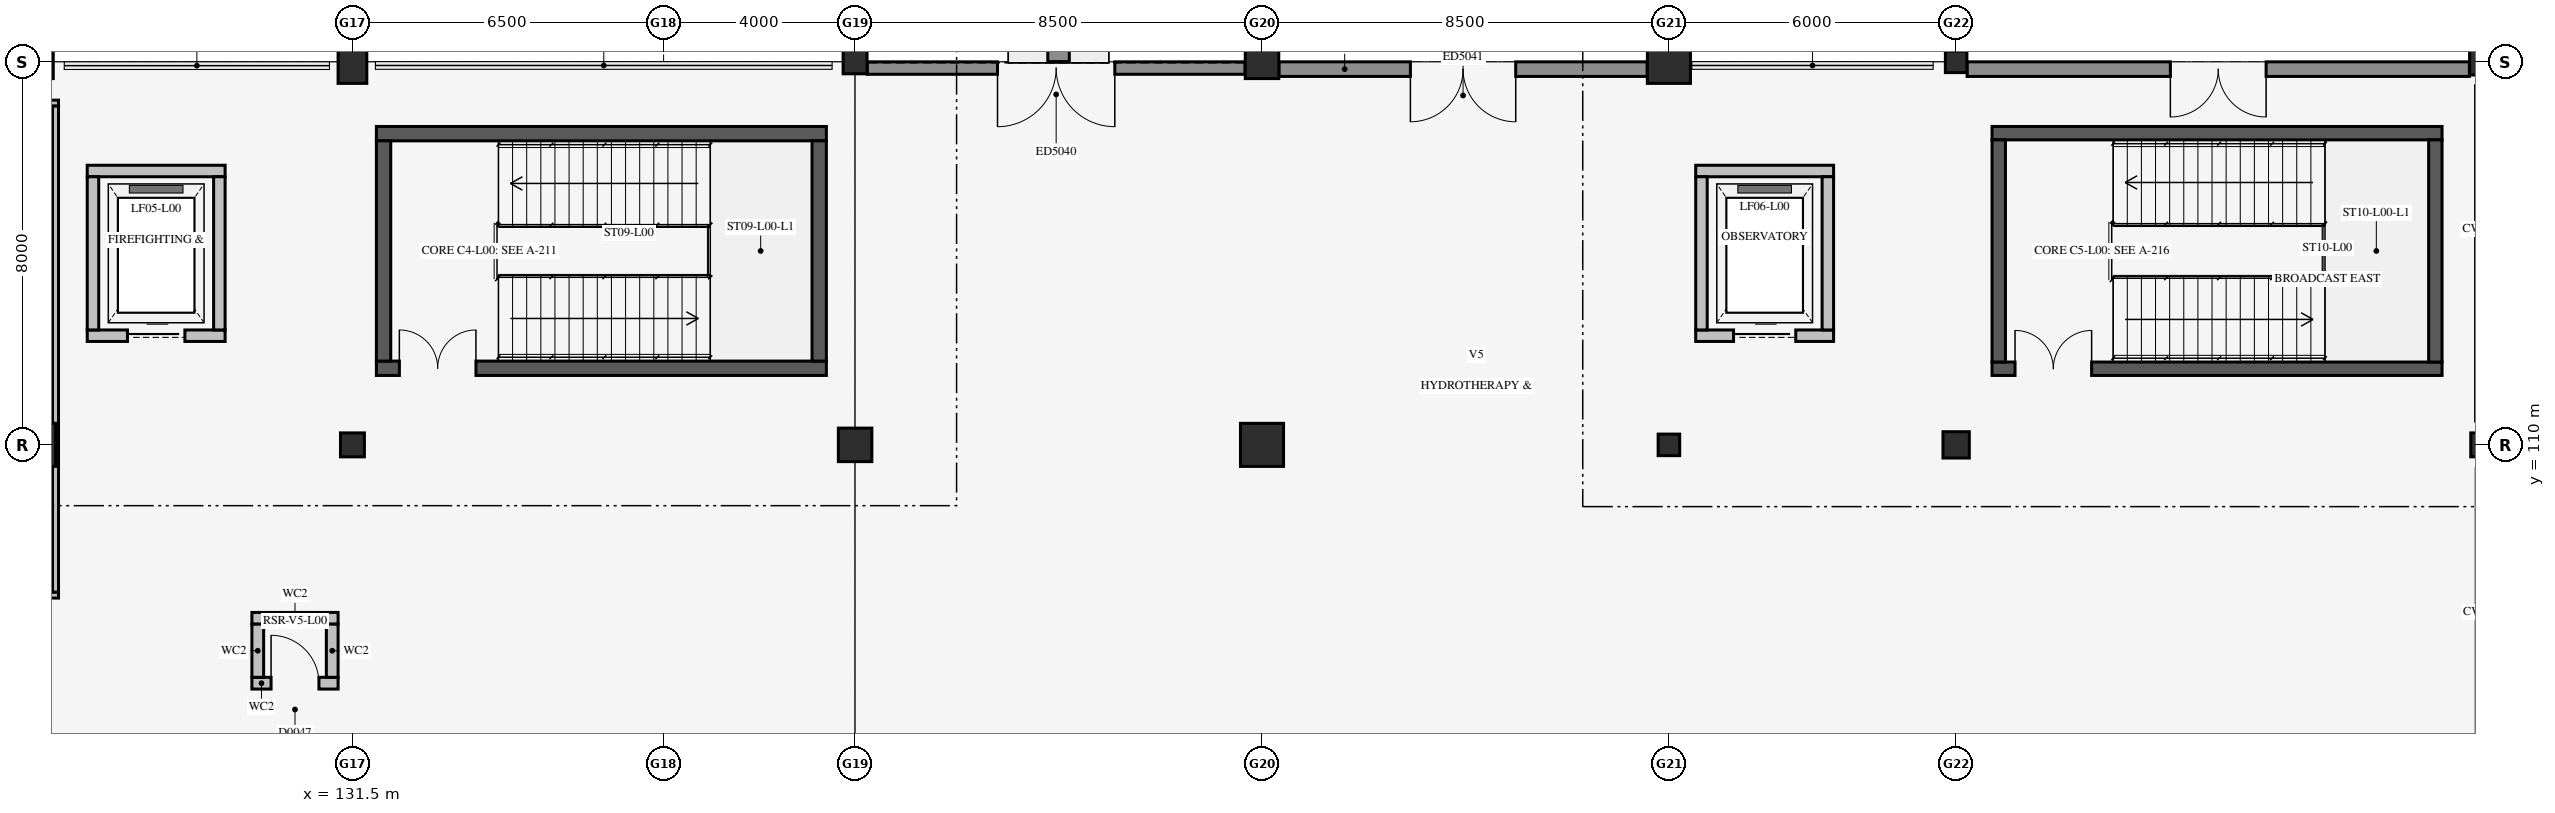
"""IFC4 building model, lengths in metres.
Left out: names, types, materials, properties, quantities, classifications, styles, units other than length and angle.
Written with IfcOpenShell. Run it as: python <this file> out.ifc"""

import sys

from ifc_helpers import new_model, si_unit, direction, frame, frame_2d, origin, origin_2d, place, context, subcontext, project, spatial, polyline, rectangle, circle, outline, extrude, element, fill, save


model = new_model("IFC4")
c1 = context("Model", 3, precision=1e-05, world=origin(), true_north=direction((0.0, 1.0)))
c2 = subcontext(c1, "Body", "Model", "MODEL_VIEW")
j1 = project(units=[si_unit("LENGTHUNIT", "METRE"), si_unit("PLANEANGLEUNIT", "RADIAN")], contexts=[c1])
p1 = place(None, origin())
s1 = spatial("IfcSite", under=j1, at=p1, CompositionType="ELEMENT")
p2 = place(p1, origin())
s2 = spatial("IfcBuilding", under=s1, at=p2, CompositionType="ELEMENT")
p3 = place(p2, origin())
s3 = spatial("IfcBuildingStorey", under=s2, at=p3, CompositionType="ELEMENT", Elevation=0.0)
p4 = place(p3, frame((132.0, 111.6, 0.0), z_axis=(0.0, 0.0, 1.0), x_axis=(1.0, 0.0, 0.0)))
e1 = element("IfcWall", 1, at=p4, inside=s3, PredefinedType="SHEAR", context=c2, shape_type="SweptSolid", body=[
    extrude(rectangle(XDim=9.4, YDim=0.3, at=frame_2d((4.7, 0.0))), origin(), (0.0, 0.0, 1.0), 5.14),
])
p5 = place(p4, frame((0.48, 0.0, 0.0)))
e2 = element("IfcOpeningElement", 2, at=p5, cuts=e1, PredefinedType="OPENING", context=c2, shape_type="SweptSolid", body=[
    extrude(rectangle(XDim=1.6, YDim=2.2, at=frame_2d((0.8, 1.1))), frame((0.0, 0.162, 0.0), z_axis=(0.0, -1.0, 0.0), x_axis=(1.0, 0.0, 0.0)), (0.0, 0.0, 1.0), 0.324),
])
p6 = place(p3, frame((132.0, 116.5, 0.0), z_axis=(0.0, 0.0, 1.0), x_axis=(1.0, 0.0, 0.0)))
e3 = element("IfcWall", 3, at=p6, inside=s3, PredefinedType="SHEAR", context=c2, shape_type="SweptSolid", body=[
    extrude(rectangle(XDim=9.4, YDim=0.3, at=frame_2d((4.7, 0.0))), origin(), (0.0, 0.0, 1.0), 5.14),
])
for number, where, z_axis, x_axis in (
    (4, (132.15, 111.75, 0.0), (0.0, 0.0, 1.0), (0.0, 1.0, 0.0)),
    (5, (141.25, 111.75, 0.0), (0.0, 0.0, 1.0), (0.0, 1.0, 0.0)),
):
    element("IfcWall", number, at=place(p3, frame(where, z_axis=z_axis, x_axis=x_axis)), inside=s3, PredefinedType="SHEAR", context=c2, shape_type="SweptSolid", body=[
        extrude(rectangle(XDim=4.6, YDim=0.3, at=frame_2d((2.3, 0.0))), origin(), (0.0, 0.0, 1.0), 5.14),
    ])
p7 = place(p3, frame((165.75, 111.59, 0.0), z_axis=(0.0, 0.0, 1.0), x_axis=(1.0, 0.0, 0.0)))
e6 = element("IfcWall", 6, at=p7, inside=s3, PredefinedType="SHEAR", context=c2, shape_type="SweptSolid", body=[
    extrude(rectangle(XDim=9.4, YDim=0.28, at=frame_2d((4.7, 0.0))), origin(), (0.0, 0.0, 1.0), 5.14),
])
p8 = place(p7, frame((0.48, 0.0, 0.0)))
e7 = element("IfcOpeningElement", 7, at=p8, cuts=e6, PredefinedType="OPENING", context=c2, shape_type="SweptSolid", body=[
    extrude(rectangle(XDim=1.6, YDim=2.2, at=frame_2d((0.8, 1.1))), frame((0.0, 0.152, 0.0), z_axis=(0.0, -1.0, 0.0), x_axis=(1.0, 0.0, 0.0)), (0.0, 0.0, 1.0), 0.304),
])
p9 = place(p3, frame((165.75, 116.51, 0.0), z_axis=(0.0, 0.0, 1.0), x_axis=(1.0, 0.0, 0.0)))
e8 = element("IfcWall", 8, at=p9, inside=s3, PredefinedType="SHEAR", context=c2, shape_type="SweptSolid", body=[
    extrude(rectangle(XDim=9.4, YDim=0.28, at=frame_2d((4.7, 0.0))), origin(), (0.0, 0.0, 1.0), 5.14),
])
for number, where, z_axis, x_axis in (
    (9, (165.89, 111.73, 0.0), (0.0, 0.0, 1.0), (0.0, 1.0, 0.0)),
    (10, (175.01, 111.73, 0.0), (0.0, 0.0, 1.0), (0.0, 1.0, 0.0)),
):
    element("IfcWall", number, at=place(p3, frame(where, z_axis=z_axis, x_axis=x_axis)), inside=s3, PredefinedType="SHEAR", context=c2, shape_type="SweptSolid", body=[
        extrude(rectangle(XDim=4.64, YDim=0.28, at=frame_2d((2.32, 0.0))), origin(), (0.0, 0.0, 1.0), 5.14),
    ])
p10 = place(p3, frame((125.96, 112.28, 0.0), z_axis=(0.0, 0.0, 1.0), x_axis=(1.0, 0.0, 0.0)))
e11 = element("IfcWall", 11, at=p10, inside=s3, PredefinedType="SOLIDWALL", context=c2, shape_type="SweptSolid", body=[
    extrude(rectangle(XDim=2.88, YDim=0.24, at=frame_2d((1.44, 0.0))), origin(), (0.0, 0.0, 1.0), 5.4),
])
p11 = place(p10, frame((0.84, 0.0, 0.0)))
e12 = element("IfcOpeningElement", 12, at=p11, cuts=e11, PredefinedType="OPENING", context=c2, shape_type="SweptSolid", body=[
    extrude(rectangle(XDim=1.2, YDim=2.2, at=frame_2d((0.6, 1.1))), frame((0.0, 0.132, 0.0), z_axis=(0.0, -1.0, 0.0), x_axis=(1.0, 0.0, 0.0)), (0.0, 0.0, 1.0), 0.264),
])
p12 = place(p3, frame((125.96, 115.72, 0.0), z_axis=(0.0, 0.0, 1.0), x_axis=(1.0, 0.0, 0.0)))
e13 = element("IfcWall", 13, at=p12, inside=s3, PredefinedType="SOLIDWALL", context=c2, shape_type="SweptSolid", body=[
    extrude(rectangle(XDim=2.88, YDim=0.24, at=frame_2d((1.44, 0.0))), origin(), (0.0, 0.0, 1.0), 5.4),
])
for number, where, z_axis, x_axis in (
    (14, (126.08, 112.4, 0.0), (0.0, 0.0, 1.0), (0.0, 1.0, 0.0)),
    (15, (128.72, 112.4, 0.0), (0.0, 0.0, 1.0), (0.0, 1.0, 0.0)),
):
    element("IfcWall", number, at=place(p3, frame(where, z_axis=z_axis, x_axis=x_axis)), inside=s3, PredefinedType="SOLIDWALL", context=c2, shape_type="SweptSolid", body=[
        extrude(rectangle(XDim=3.2, YDim=0.24, at=frame_2d((1.6, 0.0))), origin(), (0.0, 0.0, 1.0), 5.4),
    ])
p13 = place(p3, frame((159.56, 112.28, 0.0), z_axis=(0.0, 0.0, 1.0), x_axis=(1.0, 0.0, 0.0)))
e16 = element("IfcWall", 16, at=p13, inside=s3, PredefinedType="SOLIDWALL", context=c2, shape_type="SweptSolid", body=[
    extrude(rectangle(XDim=2.88, YDim=0.24, at=frame_2d((1.44, 0.0))), origin(), (0.0, 0.0, 1.0), 5.4),
])
p14 = place(p13, frame((0.79, 0.0, 0.0)))
e17 = element("IfcOpeningElement", 17, at=p14, cuts=e16, PredefinedType="OPENING", context=c2, shape_type="SweptSolid", body=[
    extrude(rectangle(XDim=1.3, YDim=2.25, at=frame_2d((0.65, 1.125))), frame((0.0, 0.132, 0.0), z_axis=(0.0, -1.0, 0.0), x_axis=(1.0, 0.0, 0.0)), (0.0, 0.0, 1.0), 0.264),
])
p15 = place(p3, frame((159.56, 115.72, 0.0), z_axis=(0.0, 0.0, 1.0), x_axis=(1.0, 0.0, 0.0)))
e18 = element("IfcWall", 18, at=p15, inside=s3, PredefinedType="SOLIDWALL", context=c2, shape_type="SweptSolid", body=[
    extrude(rectangle(XDim=2.88, YDim=0.24, at=frame_2d((1.44, 0.0))), origin(), (0.0, 0.0, 1.0), 5.4),
])
for number, where, z_axis, x_axis in (
    (19, (159.68, 112.4, 0.0), (0.0, 0.0, 1.0), (0.0, 1.0, 0.0)),
    (20, (162.32, 112.4, 0.0), (0.0, 0.0, 1.0), (0.0, 1.0, 0.0)),
):
    element("IfcWall", number, at=place(p3, frame(where, z_axis=z_axis, x_axis=x_axis)), inside=s3, PredefinedType="SOLIDWALL", context=c2, shape_type="SweptSolid", body=[
        extrude(rectangle(XDim=3.2, YDim=0.24, at=frame_2d((1.6, 0.0))), origin(), (0.0, 0.0, 1.0), 5.4),
    ])
p16 = place(p3, frame((125.0, 110.0, 0.0), z_axis=(0.0, 0.0, 1.0), x_axis=(1.0, 0.0, 0.0)))
e21 = element("IfcColumn", 21, at=p16, inside=s3, PredefinedType="COLUMN", context=c2, shape_type="SweptSolid", body=[
    extrude(rectangle(XDim=0.6, YDim=0.9, at=origin_2d()), origin(), (0.0, 0.0, 1.0), 5.4),
])
p17 = place(p3, frame((125.0, 118.0, 0.0), z_axis=(0.0, 0.0, 1.0), x_axis=(1.0, 0.0, 0.0)))
e22 = element("IfcColumn", 22, at=p17, inside=s3, PredefinedType="COLUMN", context=c2, shape_type="SweptSolid", body=[
    extrude(rectangle(XDim=0.5, YDim=0.7, at=origin_2d()), origin(), (0.0, 0.0, 1.0), 5.4),
])
p18 = place(p3, frame((131.5, 110.0, 0.0), z_axis=(0.0, 0.0, 1.0), x_axis=(1.0, 0.0, 0.0)))
e23 = element("IfcColumn", 23, at=p18, inside=s3, PredefinedType="COLUMN", context=c2, shape_type="SweptSolid", body=[
    extrude(circle(Radius=0.25, at=origin_2d()), origin(), (0.0, 0.0, 1.0), 5.4),
])
p19 = place(p3, frame((131.5, 118.0, 0.0), z_axis=(0.0, 0.0, 1.0), x_axis=(1.0, 0.0, 0.0)))
e24 = element("IfcColumn", 24, at=p19, inside=s3, PredefinedType="COLUMN", context=c2, shape_type="SweptSolid", body=[
    extrude(rectangle(XDim=0.6, YDim=0.9, at=origin_2d()), origin(), (0.0, 0.0, 1.0), 5.4),
])
p20 = place(p3, frame((142.0, 110.0, 0.0), z_axis=(0.0, 0.0, 1.0), x_axis=(1.0, 0.0, 0.0)))
e25 = element("IfcColumn", 25, at=p20, inside=s3, PredefinedType="COLUMN", context=c2, shape_type="SweptSolid", body=[
    extrude(circle(Radius=0.35, at=origin_2d()), origin(), (0.0, 0.0, 1.0), 5.4),
])
p21 = place(p3, frame((142.0, 118.0, 0.0), z_axis=(0.0, 0.0, 1.0), x_axis=(1.0, 0.0, 0.0)))
e26 = element("IfcColumn", 26, at=p21, inside=s3, PredefinedType="COLUMN", context=c2, shape_type="SweptSolid", body=[
    extrude(circle(Radius=0.25, at=origin_2d()), origin(), (0.0, 0.0, 1.0), 5.4),
])
p22 = place(p3, frame((150.5, 110.0, 0.0), z_axis=(0.0, 0.0, 1.0), x_axis=(1.0, 0.0, 0.0)))
e27 = element("IfcColumn", 27, at=p22, inside=s3, PredefinedType="COLUMN", context=c2, shape_type="SweptSolid", body=[
    extrude(circle(Radius=0.45, at=origin_2d()), origin(), (0.0, 0.0, 1.0), 5.4),
])
p23 = place(p3, frame((150.5, 118.0, 0.0), z_axis=(0.0, 0.0, 1.0), x_axis=(1.0, 0.0, 0.0)))
e28 = element("IfcColumn", 28, at=p23, inside=s3, PredefinedType="COLUMN", context=c2, shape_type="SweptSolid", body=[
    extrude(circle(Radius=0.35, at=origin_2d()), origin(), (0.0, 0.0, 1.0), 5.4),
])
p24 = place(p3, frame((159.0, 110.0, 0.0), z_axis=(0.0, 0.0, 1.0), x_axis=(1.0, 0.0, 0.0)))
e29 = element("IfcColumn", 29, at=p24, inside=s3, PredefinedType="COLUMN", context=c2, shape_type="SweptSolid", body=[
    extrude(rectangle(XDim=0.45, YDim=0.45, at=origin_2d()), origin(), (0.0, 0.0, 1.0), 5.4),
])
p25 = place(p3, frame((159.0, 118.0, 0.0), z_axis=(0.0, 0.0, 1.0), x_axis=(1.0, 0.0, 0.0)))
e30 = element("IfcColumn", 30, at=p25, inside=s3, PredefinedType="COLUMN", context=c2, shape_type="SweptSolid", body=[
    extrude(circle(Radius=0.45, at=origin_2d()), origin(), (0.0, 0.0, 1.0), 5.4),
])
p26 = place(p3, frame((165.0, 110.0, 0.0), z_axis=(0.0, 0.0, 1.0), x_axis=(1.0, 0.0, 0.0)))
e31 = element("IfcColumn", 31, at=p26, inside=s3, PredefinedType="COLUMN", context=c2, shape_type="SweptSolid", body=[
    extrude(rectangle(XDim=0.55, YDim=0.55, at=origin_2d()), origin(), (0.0, 0.0, 1.0), 5.4),
])
p27 = place(p3, frame((165.0, 118.0, 0.0), z_axis=(0.0, 0.0, 1.0), x_axis=(1.0, 0.0, 0.0)))
e32 = element("IfcColumn", 32, at=p27, inside=s3, PredefinedType="COLUMN", context=c2, shape_type="SweptSolid", body=[
    extrude(rectangle(XDim=0.45, YDim=0.45, at=origin_2d()), origin(), (0.0, 0.0, 1.0), 5.4),
])
p28 = place(p3, frame((176.0, 110.0, 0.0), z_axis=(0.0, 0.0, 1.0), x_axis=(1.0, 0.0, 0.0)))
e33 = element("IfcColumn", 33, at=p28, inside=s3, PredefinedType="COLUMN", context=c2, shape_type="SweptSolid", body=[
    extrude(rectangle(XDim=0.5, YDim=0.5, at=origin_2d()), origin(), (0.0, 0.0, 1.0), 5.4),
])
p29 = place(p3, frame((176.0, 118.0, 0.0), z_axis=(0.0, 0.0, 1.0), x_axis=(1.0, 0.0, 0.0)))
e34 = element("IfcColumn", 34, at=p29, inside=s3, PredefinedType="COLUMN", context=c2, shape_type="SweptSolid", body=[
    extrude(rectangle(XDim=0.55, YDim=0.55, at=origin_2d()), origin(), (0.0, 0.0, 1.0), 5.4),
])
p30 = place(p3, frame((129.4, 105.022, 0.0), z_axis=(0.0, 0.0, 1.0), x_axis=(1.0, 0.0, 0.0)))
e35 = element("IfcWall", 35, at=p30, inside=s3, PredefinedType="SOLIDWALL", context=c2, shape_type="SweptSolid", body=[
    extrude(rectangle(XDim=1.8, YDim=0.245, at=frame_2d((0.9, 0.0))), origin(), (0.0, 0.0, 1.0), 5.125),
])
p31 = place(p30, frame((0.4, 0.0, 0.0)))
e36 = element("IfcOpeningElement", 36, at=p31, cuts=e35, PredefinedType="OPENING", context=c2, shape_type="SweptSolid", body=[
    extrude(rectangle(XDim=1.0, YDim=2.2, at=frame_2d((0.5, 1.1))), frame((0.0, 0.135, 0.0), z_axis=(0.0, -1.0, 0.0), x_axis=(1.0, 0.0, 0.0)), (0.0, 0.0, 1.0), 0.269),
])
p32 = place(p3, frame((129.4, 106.377, 0.0), z_axis=(0.0, 0.0, 1.0), x_axis=(1.0, 0.0, 0.0)))
e37 = element("IfcWall", 37, at=p32, inside=s3, PredefinedType="SOLIDWALL", context=c2, shape_type="SweptSolid", body=[
    extrude(rectangle(XDim=1.8, YDim=0.245, at=frame_2d((0.9, 0.0))), origin(), (0.0, 0.0, 1.0), 5.125),
])
for number, where, z_axis, x_axis in (
    (38, (131.077, 105.145, 0.0), (0.0, 0.0, 1.0), (0.0, 1.0, 0.0)),
    (39, (129.522, 105.145, 0.0), (0.0, 0.0, 1.0), (0.0, 1.0, 0.0)),
):
    element("IfcWall", number, at=place(p3, frame(where, z_axis=z_axis, x_axis=x_axis)), inside=s3, PredefinedType="SOLIDWALL", context=c2, shape_type="SweptSolid", body=[
        extrude(rectangle(XDim=1.11, YDim=0.245, at=frame_2d((0.555, 0.0))), origin(), (0.0, 0.0, 1.0), 5.125),
    ])
p33 = place(p3, frame((116.573, 106.863, 0.0), z_axis=(0.0, 0.0, 1.0), x_axis=(1.0, 0.0, 0.0)))
e40 = element("IfcWall", 40, at=p33, inside=s3, PredefinedType="PARTITIONING", context=c2, shape_type="SweptSolid", body=[
    extrude(rectangle(XDim=8.787, YDim=0.125, at=frame_2d((4.394, 0.0))), origin(), (0.0, 0.0, 1.0), 5.125),
])
p34 = place(p33, frame((3.072, 0.0, 0.0)))
e41 = element("IfcOpeningElement", 41, at=p34, cuts=e40, PredefinedType="OPENING", context=c2, shape_type="SweptSolid", body=[
    extrude(rectangle(XDim=1.05, YDim=2.15, at=frame_2d((0.525, 1.075))), frame((0.0, 0.074, 0.0), z_axis=(0.0, -1.0, 0.0), x_axis=(1.0, 0.0, 0.0)), (0.0, 0.0, 1.0), 0.149),
])
p35 = place(p3, frame((116.573, 117.137, 0.0), z_axis=(0.0, 0.0, 1.0), x_axis=(1.0, 0.0, 0.0)))
e42 = element("IfcWall", 42, at=p35, inside=s3, PredefinedType="PARTITIONING", context=c2, shape_type="SweptSolid", body=[
    extrude(rectangle(XDim=8.787, YDim=0.125, at=frame_2d((4.394, 0.0))), origin(), (0.0, 0.0, 1.0), 5.125),
])
p36 = place(p3, frame((125.298, 106.925, 0.0), z_axis=(0.0, 0.0, 1.0), x_axis=(0.0, 1.0, 0.0)))
e43 = element("IfcWall", 43, at=p36, inside=s3, PredefinedType="PARTITIONING", context=c2, shape_type="SweptSolid", body=[
    extrude(rectangle(XDim=10.15, YDim=0.125, at=frame_2d((5.075, 0.0))), origin(), (0.0, 0.0, 1.0), 5.125),
])
p37 = place(p3, frame((142.254, 117.87, 0.0), z_axis=(0.0, 0.0, 1.0), x_axis=(1.0, 0.0, 0.0)))
e44 = element("IfcWall", 44, at=p37, inside=s3, PredefinedType="SOLIDWALL", context=c2, shape_type="SweptSolid", body=[
    extrude(rectangle(XDim=7.892, YDim=0.26, at=frame_2d((3.946, 0.0))), origin(), (0.0, 0.0, 1.0), 4.574),
])
p38 = place(p37, frame((2.721, 0.0, 0.0)))
e45 = element("IfcOpeningElement", 45, at=p38, cuts=e44, PredefinedType="OPENING", context=c2, shape_type="SweptSolid", body=[
    extrude(rectangle(XDim=2.45, YDim=2.95, at=frame_2d((1.225, 1.475))), frame((0.0, 0.142, 0.0), z_axis=(0.0, -1.0, 0.0), x_axis=(1.0, 0.0, 0.0)), (0.0, 0.0, 1.0), 0.284),
])
p39 = place(p3, frame((150.854, 117.847, 0.0), z_axis=(0.0, 0.0, 1.0), x_axis=(1.0, 0.0, 0.0)))
e46 = element("IfcWall", 46, at=p39, inside=s3, PredefinedType="SOLIDWALL", context=c2, shape_type="SweptSolid", body=[
    extrude(rectangle(XDim=7.692, YDim=0.305, at=frame_2d((3.846, 0.0))), origin(), (0.0, 0.0, 1.0), 4.498),
])
p40 = place(p39, frame((2.746, 0.0, 0.0)))
e47 = element("IfcOpeningElement", 47, at=p40, cuts=e46, PredefinedType="OPENING", context=c2, shape_type="SweptSolid", body=[
    extrude(rectangle(XDim=2.2, YDim=2.6, at=frame_2d((1.1, 1.3))), frame((0.0, 0.165, 0.0), z_axis=(0.0, -1.0, 0.0), x_axis=(1.0, 0.0, 0.0)), (0.0, 0.0, 1.0), 0.329),
])
p41 = place(p3, frame((165.229, 117.847, 0.0), z_axis=(0.0, 0.0, 1.0), x_axis=(1.0, 0.0, 0.0)))
e48 = element("IfcWall", 48, at=p41, inside=s3, PredefinedType="SOLIDWALL", context=c2, shape_type="SweptSolid", body=[
    extrude(rectangle(XDim=10.492, YDim=0.305, at=frame_2d((5.246, 0.0))), origin(), (0.0, 0.0, 1.0), 4.65),
])
p42 = place(p41, frame((4.246, 0.0, 0.0)))
e49 = element("IfcOpeningElement", 49, at=p42, cuts=e48, PredefinedType="OPENING", context=c2, shape_type="SweptSolid", body=[
    extrude(rectangle(XDim=2.0, YDim=2.4, at=frame_2d((1.0, 1.2))), frame((0.0, 0.165, 0.0), z_axis=(0.0, -1.0, 0.0), x_axis=(1.0, 0.0, 0.0)), (0.0, 0.0, 1.0), 0.329),
])
p43 = place(p3, frame((146.25, 127.92, -0.7), z_axis=(0.0, 0.0, 1.0), x_axis=(0.0, -1.0, 0.0)))
e50 = element("IfcWall", 50, at=p43, inside=s3, PredefinedType="USERDEFINED", context=c2, shape_type="SweptSolid", body=[
    extrude(outline(polyline([(0.0, 0.0), (9.915, 0.0), (9.915, 0.483), (0.0, 0.026), (0.0, 0.0)])), frame((0.0, 0.225, 0.0), z_axis=(0.0, -1.0, 0.0), x_axis=(1.0, 0.0, 0.0)), (0.0, 0.0, 1.0), 0.45),
])
p44 = place(p5, frame((1.6, 0.0, 0.0), z_axis=(0.0, 0.0, 1.0), x_axis=(-1.0, 0.0, 0.0)))
e51 = element("IfcDoor", 51, at=p44, inside=s3, OperationType="DOUBLE_DOOR_SINGLE_SWING", PredefinedType="DOOR", context=c2, shape_type="SweptSolid", body=[
    extrude(rectangle(XDim=1.6, YDim=2.2, at=frame_2d((0.8, 1.1))), frame((0.0, 0.025, 0.0), z_axis=(0.0, -1.0, 0.0), x_axis=(1.0, 0.0, 0.0)), (0.0, 0.0, 1.0), 0.05),
])
fill(e2, e51)
p45 = place(p8, frame((1.6, 0.0, 0.0), z_axis=(0.0, 0.0, 1.0), x_axis=(-1.0, 0.0, 0.0)))
e52 = element("IfcDoor", 52, at=p45, inside=s3, OperationType="DOUBLE_DOOR_SINGLE_SWING", PredefinedType="DOOR", context=c2, shape_type="SweptSolid", body=[
    extrude(rectangle(XDim=1.6, YDim=2.2, at=frame_2d((0.8, 1.1))), frame((0.0, 0.025, 0.0), z_axis=(0.0, -1.0, 0.0), x_axis=(1.0, 0.0, 0.0)), (0.0, 0.0, 1.0), 0.05),
])
fill(e7, e52)
p46 = place(p31, origin())
e53 = element("IfcDoor", 53, at=p46, inside=s3, OperationType="SINGLE_SWING_LEFT", PredefinedType="DOOR", context=c2, shape_type="SweptSolid", body=[
    extrude(rectangle(XDim=1.0, YDim=2.2, at=frame_2d((0.5, 1.1))), frame((0.0, 0.025, 0.0), z_axis=(0.0, -1.0, 0.0), x_axis=(1.0, 0.0, 0.0)), (0.0, 0.0, 1.0), 0.05),
])
fill(e36, e53)
p47 = place(p38, origin())
e54 = element("IfcDoor", 54, at=p47, inside=s3, OperationType="DOUBLE_DOOR_SINGLE_SWING", PredefinedType="DOOR", context=c2, shape_type="SweptSolid", body=[
    extrude(rectangle(XDim=2.45, YDim=2.95, at=frame_2d((1.225, 1.475))), frame((0.0, 0.025, 0.0), z_axis=(0.0, -1.0, 0.0), x_axis=(1.0, 0.0, 0.0)), (0.0, 0.0, 1.0), 0.05),
])
fill(e45, e54)
p48 = place(p40, origin())
e55 = element("IfcDoor", 55, at=p48, inside=s3, OperationType="DOUBLE_DOOR_SINGLE_SWING", PredefinedType="DOOR", context=c2, shape_type="SweptSolid", body=[
    extrude(rectangle(XDim=2.2, YDim=2.6, at=frame_2d((1.1, 1.3))), frame((0.0, 0.025, 0.0), z_axis=(0.0, -1.0, 0.0), x_axis=(1.0, 0.0, 0.0)), (0.0, 0.0, 1.0), 0.05),
])
fill(e47, e55)
p49 = place(p42, origin())
e56 = element("IfcDoor", 56, at=p49, inside=s3, OperationType="DOUBLE_DOOR_SINGLE_SWING", PredefinedType="DOOR", context=c2, shape_type="SweptSolid", body=[
    extrude(rectangle(XDim=2.0, YDim=2.4, at=frame_2d((1.0, 1.2))), frame((0.0, 0.025, 0.0), z_axis=(0.0, -1.0, 0.0), x_axis=(1.0, 0.0, 0.0)), (0.0, 0.0, 1.0), 0.05),
])
fill(e49, e56)
p50 = place(p11, origin())
e57 = element("IfcDoor", 57, at=p50, inside=s3, OperationType="SLIDING_TO_LEFT", PredefinedType="USERDEFINED", context=c2, shape_type="SweptSolid", body=[
    extrude(rectangle(XDim=1.2, YDim=2.2, at=frame_2d((0.6, 1.1))), frame((0.0, 0.025, 0.0), z_axis=(0.0, -1.0, 0.0), x_axis=(1.0, 0.0, 0.0)), (0.0, 0.0, 1.0), 0.05),
])
fill(e12, e57)
p51 = place(p14, origin())
e58 = element("IfcDoor", 58, at=p51, inside=s3, OperationType="SLIDING_TO_LEFT", PredefinedType="USERDEFINED", context=c2, shape_type="SweptSolid", body=[
    extrude(rectangle(XDim=1.3, YDim=2.25, at=frame_2d((0.65, 1.125))), frame((0.0, 0.025, 0.0), z_axis=(0.0, -1.0, 0.0), x_axis=(1.0, 0.0, 0.0)), (0.0, 0.0, 1.0), 0.05),
])
fill(e17, e58)
save(model, sys.argv[1])
